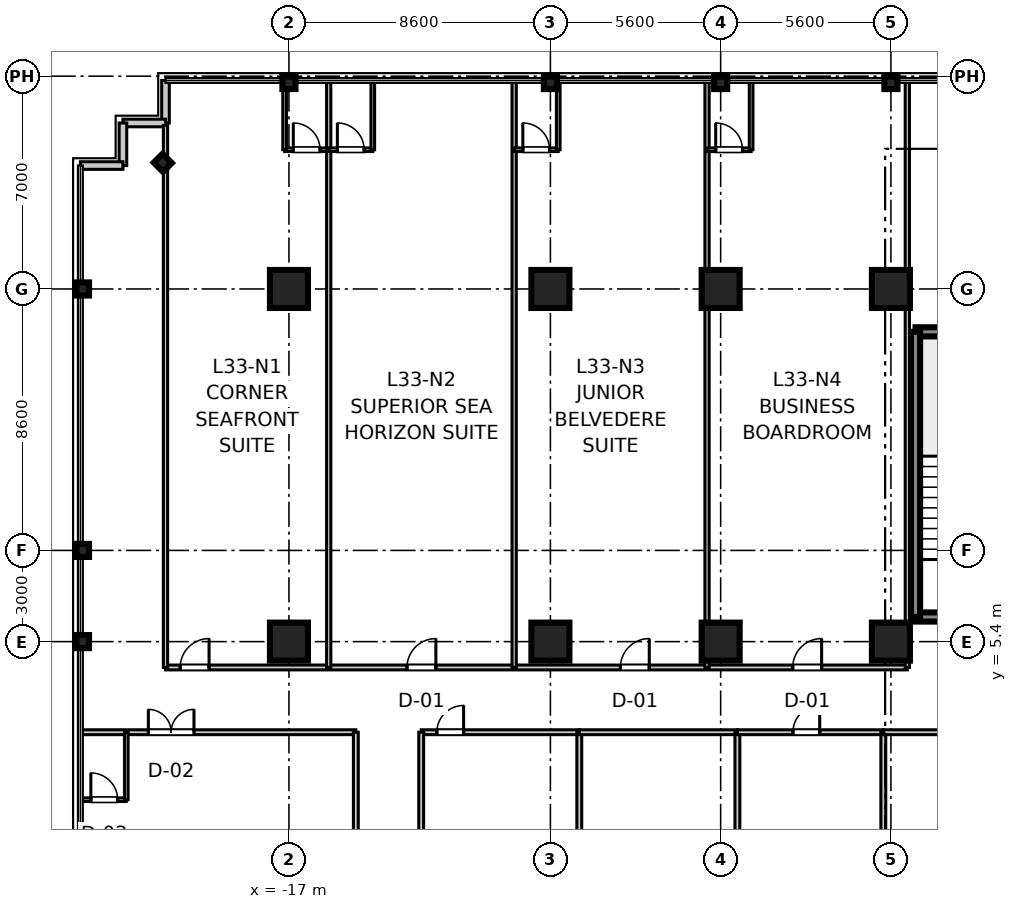
"""IFC4 building model, lengths in metres.
Left out: names, types, materials, properties, quantities, classifications, styles, units other than length and angle.
Written with IfcOpenShell. Run it as: python <this file> out.ifc"""

import sys

from ifc_helpers import new_model, si_unit, direction, frame, frame_2d, origin, origin_2d, place, context, subcontext, project, spatial, rectangle, i_section, extrude, source, transform, mapped, element, fill, save


model = new_model("IFC4")
c1 = context("Model", 3, precision=1e-05, world=origin(), true_north=direction((0.0, 1.0)))
c2 = subcontext(c1, "Body", "Model", "MODEL_VIEW")
j1 = project(units=[si_unit("LENGTHUNIT", "METRE"), si_unit("PLANEANGLEUNIT", "RADIAN")], contexts=[c1])
p1 = place(None, origin())
s1 = spatial("IfcSite", under=j1, at=p1, CompositionType="ELEMENT")
p2 = place(p1, origin())
s2 = spatial("IfcBuilding", under=s1, at=p2, CompositionType="ELEMENT")
p3 = place(p2, frame((0.0, 0.0, 132.1)))
s3 = spatial("IfcBuildingStorey", under=s2, at=p3, CompositionType="ELEMENT", Elevation=132.1)
m1 = source(origin(), c2, "Body", "SweptSolid", [
    extrude(rectangle(XDim=1.25, YDim=1.25, at=origin_2d()), origin(), (0.0, 0.0, 1.0), 3.605),
])
for number, where, z_axis, x_axis in (
    (1, (-17.0, 5.4, 0.0), (0.0, 0.0, 1.0), (1.0, 0.0, 0.0)),
    (2, (-17.0, 17.0, 0.0), (0.0, 0.0, 1.0), (1.0, 0.0, 0.0)),
    (3, (-8.4, 5.4, 0.0), (0.0, 0.0, 1.0), (1.0, 0.0, 0.0)),
    (4, (-8.4, 17.0, 0.0), (0.0, 0.0, 1.0), (1.0, 0.0, 0.0)),
    (5, (-2.8, 5.4, 0.0), (0.0, 0.0, 1.0), (1.0, 0.0, 0.0)),
    (6, (-2.8, 17.0, 0.0), (0.0, 0.0, 1.0), (1.0, 0.0, 0.0)),
    (7, (2.8, 5.4, 0.0), (0.0, 0.0, 1.0), (1.0, 0.0, 0.0)),
    (8, (2.8, 17.0, 0.0), (0.0, 0.0, 1.0), (1.0, 0.0, 0.0)),
):
    element("IfcColumn", number, at=place(p3, frame(where, z_axis=z_axis, x_axis=x_axis)), inside=s3, PredefinedType="COLUMN", context=c2, shape_type="MappedRepresentation", body=[
        mapped(m1, transform((0.0, 0.0, 0.0), scale=1.0)),
    ])
m2 = source(origin(), c2, "Body", "SweptSolid", [
    extrude(i_section(OverallWidth=0.409, OverallDepth=0.43, WebThickness=0.021, FlangeThickness=0.034, at=origin_2d()), origin(), (0.0, 0.0, 1.0), 3.605),
])
for number, where, z_axis, x_axis in (
    (9, (-23.78, 5.4, 0.0), (0.0, 0.0, 1.0), (1.0, 0.0, 0.0)),
    (10, (-23.78, 8.4, 0.0), (0.0, 0.0, 1.0), (1.0, 0.0, 0.0)),
    (11, (-23.78, 17.0, 0.0), (0.0, 0.0, 1.0), (1.0, 0.0, 0.0)),
    (12, (-17.0, 23.78, 0.0), (0.0, 0.0, 1.0), (0.0, 1.0, 0.0)),
    (13, (-8.4, 23.78, 0.0), (0.0, 0.0, 1.0), (0.0, 1.0, 0.0)),
    (14, (-2.8, 23.78, 0.0), (0.0, 0.0, 1.0), (0.0, 1.0, 0.0)),
    (15, (2.8, 23.78, 0.0), (0.0, 0.0, 1.0), (0.0, 1.0, 0.0)),
    (16, (-21.15, 21.15, 0.0), (0.0, 0.0, 1.0), (0.707, 0.707, 0.0)),
):
    element("IfcColumn", number, at=place(p3, frame(where, z_axis=z_axis, x_axis=x_axis)), inside=s3, PredefinedType="COLUMN", context=c2, shape_type="MappedRepresentation", body=[
        mapped(m2, transform((0.0, 0.0, 0.0), scale=1.0)),
    ])
m3 = source(origin(), c2, "Body", "SweptSolid", [
    extrude(rectangle(XDim=3.98, YDim=0.3, at=frame_2d((1.99, 0.0))), origin(), (0.0, 0.0, 1.0), 3.38),
])
for number, where, z_axis, x_axis in (
    (17, (3.61, 6.21, 0.0), (0.0, 0.0, 1.0), (1.0, 0.0, 0.0)),
    (18, (3.61, 15.59, 0.0), (0.0, 0.0, 1.0), (1.0, 0.0, 0.0)),
):
    element("IfcWall", number, at=place(p3, frame(where, z_axis=z_axis, x_axis=x_axis)), inside=s3, PredefinedType="SHEAR", context=c2, shape_type="MappedRepresentation", body=[
        mapped(m3, transform((0.0, 0.0, 0.0), scale=1.0)),
    ])
m4 = source(origin(), c2, "Body", "SweptSolid", [
    extrude(rectangle(XDim=9.38, YDim=0.3, at=frame_2d((4.69, 0.0))), origin(), (0.0, 0.0, 1.0), 3.38),
])
p4 = place(p3, frame((3.61, 6.21, 0.0), z_axis=(0.0, 0.0, 1.0), x_axis=(0.0, 1.0, 0.0)))
e19 = element("IfcWall", 19, at=p4, inside=s3, PredefinedType="SHEAR", context=c2, shape_type="MappedRepresentation", body=[
    mapped(m4, transform((0.0, 0.0, 0.0), scale=1.0)),
])
m5 = source(origin(), c2, "Body", "SweptSolid", [
    extrude(rectangle(XDim=1.4, YDim=0.25, at=frame_2d((0.7, 0.0))), origin(), (0.0, 0.0, 1.0), 3.38),
])
p5 = place(p3, frame((-21.06, 22.46, 0.0), z_axis=(0.0, 0.0, 1.0), x_axis=(0.0, 1.0, 0.0)))
e20 = element("IfcWall", 20, at=p5, inside=s3, PredefinedType="STANDARD", context=c2, shape_type="MappedRepresentation", body=[
    mapped(m5, transform((0.0, 0.0, 0.0), scale=1.0)),
])
m6 = source(origin(), c2, "Body", "SweptSolid", [
    extrude(rectangle(XDim=1.4, YDim=0.25, at=frame_2d((0.7, 0.0))), origin(), (0.0, 0.0, 1.0), 3.38),
])
for number, where, z_axis, x_axis in (
    (21, (-22.46, 22.46, 0.0), (0.0, 0.0, 1.0), (1.0, 0.0, 0.0)),
    (22, (-22.46, 21.06, 0.0), (0.0, 0.0, 1.0), (0.0, 1.0, 0.0)),
):
    element("IfcWall", number, at=place(p3, frame(where, z_axis=z_axis, x_axis=x_axis)), inside=s3, PredefinedType="STANDARD", context=c2, shape_type="MappedRepresentation", body=[
        mapped(m6, transform((0.0, 0.0, 0.0), scale=1.0)),
    ])
p6 = place(p3, frame((-23.86, 21.06, 0.0), z_axis=(0.0, 0.0, 1.0), x_axis=(1.0, 0.0, 0.0)))
e23 = element("IfcWall", 23, at=p6, inside=s3, PredefinedType="STANDARD", context=c2, shape_type="MappedRepresentation", body=[
    mapped(m5, transform((0.0, 0.0, 0.0), scale=1.0)),
])
m7 = source(origin(), c2, "Body", "SweptSolid", [
    extrude(rectangle(XDim=24.4, YDim=0.16, at=frame_2d((12.2, 0.0))), origin(), (0.0, 0.0, 1.0), 2.72),
])
p7 = place(p3, frame((-21.06, 4.55, 0.0), z_axis=(0.0, 0.0, 1.0), x_axis=(1.0, 0.0, 0.0)))
e24 = element("IfcWall", 24, at=p7, inside=s3, PredefinedType="PARTITIONING", context=c2, shape_type="MappedRepresentation", body=[
    mapped(m7, transform((0.0, 0.0, 0.0), scale=1.0)),
])
p8 = place(p7, frame((0.483, 0.0, 0.0)))
e25 = element("IfcOpeningElement", 25, at=p8, cuts=e24, PredefinedType="OPENING", context=c2, shape_type="SweptSolid", body=[
    extrude(rectangle(XDim=0.95, YDim=2.1, at=frame_2d((0.475, 1.05))), frame((0.0, 0.09, 0.0), z_axis=(0.0, -1.0, 0.0), x_axis=(1.0, 0.0, 0.0)), (0.0, 0.0, 1.0), 0.18),
])
p9 = place(p7, frame((7.943, 0.0, 0.0)))
e26 = element("IfcOpeningElement", 26, at=p9, cuts=e24, PredefinedType="OPENING", context=c2, shape_type="SweptSolid", body=[
    extrude(rectangle(XDim=0.95, YDim=2.1, at=frame_2d((0.475, 1.05))), frame((0.0, 0.09, 0.0), z_axis=(0.0, -1.0, 0.0), x_axis=(1.0, 0.0, 0.0)), (0.0, 0.0, 1.0), 0.18),
])
p10 = place(p7, frame((14.962, 0.0, 0.0)))
e27 = element("IfcOpeningElement", 27, at=p10, cuts=e24, PredefinedType="OPENING", context=c2, shape_type="SweptSolid", body=[
    extrude(rectangle(XDim=0.95, YDim=2.1, at=frame_2d((0.475, 1.05))), frame((0.0, 0.09, 0.0), z_axis=(0.0, -1.0, 0.0), x_axis=(1.0, 0.0, 0.0)), (0.0, 0.0, 1.0), 0.18),
])
p11 = place(p7, frame((20.631, 0.0, 0.0)))
e28 = element("IfcOpeningElement", 28, at=p11, cuts=e24, PredefinedType="OPENING", context=c2, shape_type="SweptSolid", body=[
    extrude(rectangle(XDim=0.95, YDim=2.1, at=frame_2d((0.475, 1.05))), frame((0.0, 0.09, 0.0), z_axis=(0.0, -1.0, 0.0), x_axis=(1.0, 0.0, 0.0)), (0.0, 0.0, 1.0), 0.18),
])
m8 = source(origin(), c2, "Body", "SweptSolid", [
    extrude(rectangle(XDim=17.83, YDim=0.14, at=frame_2d((8.915, 0.0))), origin(), (0.0, 0.0, 1.0), 2.72),
])
p12 = place(p3, frame((-21.06, 4.55, 0.0), z_axis=(0.0, 0.0, 1.0), x_axis=(0.0, 1.0, 0.0)))
e29 = element("IfcWall", 29, at=p12, inside=s3, PredefinedType="PARTITIONING", context=c2, shape_type="MappedRepresentation", body=[
    mapped(m8, transform((0.0, 0.0, 0.0), scale=1.0)),
])
m9 = source(origin(), c2, "Body", "SweptSolid", [
    extrude(rectangle(XDim=19.25, YDim=0.14, at=frame_2d((9.625, 0.0))), origin(), (0.0, 0.0, 1.0), 2.72),
])
p13 = place(p3, frame((3.34, 4.55, 0.0), z_axis=(0.0, 0.0, 1.0), x_axis=(0.0, 1.0, 0.0)))
e30 = element("IfcWall", 30, at=p13, inside=s3, PredefinedType="PARTITIONING", context=c2, shape_type="MappedRepresentation", body=[
    mapped(m9, transform((0.0, 0.0, 0.0), scale=1.0)),
])
m10 = source(origin(), c2, "Body", "SweptSolid", [
    extrude(rectangle(XDim=1.45, YDim=0.12, at=frame_2d((0.725, 0.0))), origin(), (0.0, 0.0, 1.0), 2.72),
])
p14 = place(p3, frame((-17.142, 21.58, 0.0), z_axis=(0.0, 0.0, 1.0), x_axis=(1.0, 0.0, 0.0)))
e31 = element("IfcWall", 31, at=p14, inside=s3, PredefinedType="PARTITIONING", context=c2, shape_type="MappedRepresentation", body=[
    mapped(m10, transform((0.0, 0.0, 0.0), scale=1.0)),
])
p15 = place(p14, frame((0.285, 0.0, 0.0)))
e32 = element("IfcOpeningElement", 32, at=p15, cuts=e31, PredefinedType="OPENING", context=c2, shape_type="SweptSolid", body=[
    extrude(rectangle(XDim=0.88, YDim=2.1, at=frame_2d((0.44, 1.05))), frame((0.0, 0.07, 0.0), z_axis=(0.0, -1.0, 0.0), x_axis=(1.0, 0.0, 0.0)), (0.0, 0.0, 1.0), 0.14),
])
m11 = source(origin(), c2, "Body", "SweptSolid", [
    extrude(rectangle(XDim=2.22, YDim=0.12, at=frame_2d((1.11, 0.0))), origin(), (0.0, 0.0, 1.0), 2.72),
])
p16 = place(p3, frame((-17.142, 21.58, 0.0), z_axis=(0.0, 0.0, 1.0), x_axis=(0.0, 1.0, 0.0)))
e33 = element("IfcWall", 33, at=p16, inside=s3, PredefinedType="PARTITIONING", context=c2, shape_type="MappedRepresentation", body=[
    mapped(m11, transform((0.0, 0.0, 0.0), scale=1.0)),
])
p17 = place(p3, frame((-15.692, 4.55, 0.0), z_axis=(0.0, 0.0, 1.0), x_axis=(0.0, 1.0, 0.0)))
e34 = element("IfcWall", 34, at=p17, inside=s3, PredefinedType="PARTITIONING", context=c2, shape_type="MappedRepresentation", body=[
    mapped(m9, transform((0.0, 0.0, 0.0), scale=1.0)),
])
m12 = source(origin(), c2, "Body", "SweptSolid", [
    extrude(rectangle(XDim=1.45, YDim=0.12, at=frame_2d((0.725, 0.0))), origin(), (0.0, 0.0, 1.0), 2.72),
])
p18 = place(p3, frame((-15.692, 21.58, 0.0), z_axis=(0.0, 0.0, 1.0), x_axis=(1.0, 0.0, 0.0)))
e35 = element("IfcWall", 35, at=p18, inside=s3, PredefinedType="PARTITIONING", context=c2, shape_type="MappedRepresentation", body=[
    mapped(m12, transform((0.0, 0.0, 0.0), scale=1.0)),
])
p19 = place(p18, frame((0.285, 0.0, 0.0)))
e36 = element("IfcOpeningElement", 36, at=p19, cuts=e35, PredefinedType="OPENING", context=c2, shape_type="SweptSolid", body=[
    extrude(rectangle(XDim=0.88, YDim=2.1, at=frame_2d((0.44, 1.05))), frame((0.0, 0.07, 0.0), z_axis=(0.0, -1.0, 0.0), x_axis=(1.0, 0.0, 0.0)), (0.0, 0.0, 1.0), 0.14),
])
p20 = place(p3, frame((-14.242, 21.58, 0.0), z_axis=(0.0, 0.0, 1.0), x_axis=(0.0, 1.0, 0.0)))
e37 = element("IfcWall", 37, at=p20, inside=s3, PredefinedType="PARTITIONING", context=c2, shape_type="MappedRepresentation", body=[
    mapped(m11, transform((0.0, 0.0, 0.0), scale=1.0)),
])
p21 = place(p3, frame((-9.592, 4.55, 0.0), z_axis=(0.0, 0.0, 1.0), x_axis=(0.0, 1.0, 0.0)))
e38 = element("IfcWall", 38, at=p21, inside=s3, PredefinedType="PARTITIONING", context=c2, shape_type="MappedRepresentation", body=[
    mapped(m9, transform((0.0, 0.0, 0.0), scale=1.0)),
])
p22 = place(p3, frame((-9.592, 21.58, 0.0), z_axis=(0.0, 0.0, 1.0), x_axis=(1.0, 0.0, 0.0)))
e39 = element("IfcWall", 39, at=p22, inside=s3, PredefinedType="PARTITIONING", context=c2, shape_type="MappedRepresentation", body=[
    mapped(m12, transform((0.0, 0.0, 0.0), scale=1.0)),
])
p23 = place(p22, frame((0.285, 0.0, 0.0)))
e40 = element("IfcOpeningElement", 40, at=p23, cuts=e39, PredefinedType="OPENING", context=c2, shape_type="SweptSolid", body=[
    extrude(rectangle(XDim=0.88, YDim=2.1, at=frame_2d((0.44, 1.05))), frame((0.0, 0.07, 0.0), z_axis=(0.0, -1.0, 0.0), x_axis=(1.0, 0.0, 0.0)), (0.0, 0.0, 1.0), 0.14),
])
p24 = place(p3, frame((-8.142, 21.58, 0.0), z_axis=(0.0, 0.0, 1.0), x_axis=(0.0, 1.0, 0.0)))
e41 = element("IfcWall", 41, at=p24, inside=s3, PredefinedType="PARTITIONING", context=c2, shape_type="MappedRepresentation", body=[
    mapped(m11, transform((0.0, 0.0, 0.0), scale=1.0)),
])
p25 = place(p3, frame((-3.248, 4.55, 0.0), z_axis=(0.0, 0.0, 1.0), x_axis=(0.0, 1.0, 0.0)))
e42 = element("IfcWall", 42, at=p25, inside=s3, PredefinedType="PARTITIONING", context=c2, shape_type="MappedRepresentation", body=[
    mapped(m9, transform((0.0, 0.0, 0.0), scale=1.0)),
])
p26 = place(p3, frame((-3.248, 21.58, 0.0), z_axis=(0.0, 0.0, 1.0), x_axis=(1.0, 0.0, 0.0)))
e43 = element("IfcWall", 43, at=p26, inside=s3, PredefinedType="PARTITIONING", context=c2, shape_type="MappedRepresentation", body=[
    mapped(m12, transform((0.0, 0.0, 0.0), scale=1.0)),
])
p27 = place(p26, frame((0.285, 0.0, 0.0)))
e44 = element("IfcOpeningElement", 44, at=p27, cuts=e43, PredefinedType="OPENING", context=c2, shape_type="SweptSolid", body=[
    extrude(rectangle(XDim=0.88, YDim=2.1, at=frame_2d((0.44, 1.05))), frame((0.0, 0.07, 0.0), z_axis=(0.0, -1.0, 0.0), x_axis=(1.0, 0.0, 0.0)), (0.0, 0.0, 1.0), 0.14),
])
p28 = place(p3, frame((-1.798, 21.58, 0.0), z_axis=(0.0, 0.0, 1.0), x_axis=(0.0, 1.0, 0.0)))
e45 = element("IfcWall", 45, at=p28, inside=s3, PredefinedType="PARTITIONING", context=c2, shape_type="MappedRepresentation", body=[
    mapped(m11, transform((0.0, 0.0, 0.0), scale=1.0)),
])
m13 = source(origin(), c2, "Body", "SweptSolid", [
    extrude(rectangle(XDim=9.0, YDim=0.16, at=frame_2d((4.5, 0.0))), origin(), (0.0, 0.0, 1.0), 2.72),
])
p29 = place(p3, frame((-23.8, 2.42, 0.0), z_axis=(0.0, 0.0, 1.0), x_axis=(1.0, 0.0, 0.0)))
e46 = element("IfcWall", 46, at=p29, inside=s3, PredefinedType="PARTITIONING", context=c2, shape_type="MappedRepresentation", body=[
    mapped(m13, transform((0.0, 0.0, 0.0), scale=1.0)),
])
p30 = place(p29, frame((2.176, 0.0, 0.0)))
e47 = element("IfcOpeningElement", 47, at=p30, cuts=e46, PredefinedType="OPENING", context=c2, shape_type="SweptSolid", body=[
    extrude(rectangle(XDim=1.5, YDim=2.15, at=frame_2d((0.75, 1.075))), frame((0.0, 0.09, 0.0), z_axis=(0.0, -1.0, 0.0), x_axis=(1.0, 0.0, 0.0)), (0.0, 0.0, 1.0), 0.18),
])
m14 = source(origin(), c2, "Body", "SweptSolid", [
    extrude(rectangle(XDim=4.84, YDim=0.16, at=frame_2d((2.42, 0.0))), origin(), (0.0, 0.0, 1.0), 2.72),
])
p31 = place(p3, frame((-14.8, -2.42, 0.0), z_axis=(0.0, 0.0, 1.0), x_axis=(0.0, 1.0, 0.0)))
e48 = element("IfcWall", 48, at=p31, inside=s3, PredefinedType="PARTITIONING", context=c2, shape_type="MappedRepresentation", body=[
    mapped(m14, transform((0.0, 0.0, 0.0), scale=1.0)),
])
p32 = place(p3, frame((-23.8, 0.2, 0.0), z_axis=(0.0, 0.0, 1.0), x_axis=(1.0, 0.0, 0.0)))
e49 = element("IfcWall", 49, at=p32, inside=s3, PredefinedType="PARTITIONING", context=c2, shape_type="MappedRepresentation", body=[
    mapped(m12, transform((0.0, 0.0, 0.0), scale=1.0)),
])
p33 = place(p32, frame((0.285, 0.0, 0.0)))
e50 = element("IfcOpeningElement", 50, at=p33, cuts=e49, PredefinedType="OPENING", context=c2, shape_type="SweptSolid", body=[
    extrude(rectangle(XDim=0.88, YDim=2.1, at=frame_2d((0.44, 1.05))), frame((0.0, 0.07, 0.0), z_axis=(0.0, -1.0, 0.0), x_axis=(1.0, 0.0, 0.0)), (0.0, 0.0, 1.0), 0.14),
])
p34 = place(p3, frame((-22.35, 0.2, 0.0), z_axis=(0.0, 0.0, 1.0), x_axis=(0.0, 1.0, 0.0)))
e51 = element("IfcWall", 51, at=p34, inside=s3, PredefinedType="PARTITIONING", context=c2, shape_type="MappedRepresentation", body=[
    mapped(m11, transform((0.0, 0.0, 0.0), scale=1.0)),
])
m15 = source(origin(), c2, "Body", "SweptSolid", [
    extrude(rectangle(XDim=5.2, YDim=0.16, at=frame_2d((2.6, 0.0))), origin(), (0.0, 0.0, 1.0), 2.72),
])
p35 = place(p3, frame((-12.65, 2.42, 0.0), z_axis=(0.0, 0.0, 1.0), x_axis=(1.0, 0.0, 0.0)))
e52 = element("IfcWall", 52, at=p35, inside=s3, PredefinedType="PARTITIONING", context=c2, shape_type="MappedRepresentation", body=[
    mapped(m15, transform((0.0, 0.0, 0.0), scale=1.0)),
])
p36 = place(p35, frame((0.515, 0.0, 0.0)))
e53 = element("IfcOpeningElement", 53, at=p36, cuts=e52, PredefinedType="OPENING", context=c2, shape_type="SweptSolid", body=[
    extrude(rectangle(XDim=0.88, YDim=2.1, at=frame_2d((0.44, 1.05))), frame((0.0, 0.09, 0.0), z_axis=(0.0, -1.0, 0.0), x_axis=(1.0, 0.0, 0.0)), (0.0, 0.0, 1.0), 0.18),
])
for number, where, z_axis, x_axis in (
    (54, (-12.65, -2.42, 0.0), (0.0, 0.0, 1.0), (0.0, 1.0, 0.0)),
    (55, (-7.45, -2.42, 0.0), (0.0, 0.0, 1.0), (0.0, 1.0, 0.0)),
):
    element("IfcWall", number, at=place(p3, frame(where, z_axis=z_axis, x_axis=x_axis)), inside=s3, PredefinedType="PARTITIONING", context=c2, shape_type="MappedRepresentation", body=[
        mapped(m14, transform((0.0, 0.0, 0.0), scale=1.0)),
    ])
p37 = place(p3, frame((-7.45, 2.42, 0.0), z_axis=(0.0, 0.0, 1.0), x_axis=(1.0, 0.0, 0.0)))
e56 = element("IfcWall", 56, at=p37, inside=s3, PredefinedType="PARTITIONING", context=c2, shape_type="MappedRepresentation", body=[
    mapped(m15, transform((0.0, 0.0, 0.0), scale=1.0)),
])
p38 = place(p3, frame((-2.25, -2.42, 0.0), z_axis=(0.0, 0.0, 1.0), x_axis=(0.0, 1.0, 0.0)))
e57 = element("IfcWall", 57, at=p38, inside=s3, PredefinedType="PARTITIONING", context=c2, shape_type="MappedRepresentation", body=[
    mapped(m14, transform((0.0, 0.0, 0.0), scale=1.0)),
])
m16 = source(origin(), c2, "Body", "SweptSolid", [
    extrude(rectangle(XDim=4.8, YDim=0.16, at=frame_2d((2.4, 0.0))), origin(), (0.0, 0.0, 1.0), 2.72),
])
p39 = place(p3, frame((-2.25, 2.42, 0.0), z_axis=(0.0, 0.0, 1.0), x_axis=(1.0, 0.0, 0.0)))
e58 = element("IfcWall", 58, at=p39, inside=s3, PredefinedType="PARTITIONING", context=c2, shape_type="MappedRepresentation", body=[
    mapped(m16, transform((0.0, 0.0, 0.0), scale=1.0)),
])
p40 = place(p39, frame((1.828, 0.0, 0.0)))
e59 = element("IfcOpeningElement", 59, at=p40, cuts=e58, PredefinedType="OPENING", context=c2, shape_type="SweptSolid", body=[
    extrude(rectangle(XDim=0.88, YDim=2.1, at=frame_2d((0.44, 1.05))), frame((0.0, 0.09, 0.0), z_axis=(0.0, -1.0, 0.0), x_axis=(1.0, 0.0, 0.0)), (0.0, 0.0, 1.0), 0.18),
])
p41 = place(p3, frame((2.55, -2.42, 0.0), z_axis=(0.0, 0.0, 1.0), x_axis=(0.0, 1.0, 0.0)))
e60 = element("IfcWall", 60, at=p41, inside=s3, PredefinedType="PARTITIONING", context=c2, shape_type="MappedRepresentation", body=[
    mapped(m14, transform((0.0, 0.0, 0.0), scale=1.0)),
])
p42 = place(p3, frame((2.55, 2.42, 0.0), z_axis=(0.0, 0.0, 1.0), x_axis=(1.0, 0.0, 0.0)))
e61 = element("IfcWall", 61, at=p42, inside=s3, PredefinedType="PARTITIONING", context=c2, shape_type="MappedRepresentation", body=[
    mapped(m16, transform((0.0, 0.0, 0.0), scale=1.0)),
])
m17 = source(origin(), c2, "Body", "SweptSolid", [
    extrude(rectangle(XDim=0.88, YDim=2.1, at=frame_2d((0.44, 1.05))), frame((0.0, 0.025, 0.0), z_axis=(0.0, -1.0, 0.0), x_axis=(1.0, 0.0, 0.0)), (0.0, 0.0, 1.0), 0.05),
])
p43 = place(p15, origin())
e62 = element("IfcDoor", 62, at=p43, inside=s3, OperationType="SINGLE_SWING_LEFT", PredefinedType="DOOR", context=c2, shape_type="MappedRepresentation", body=[
    mapped(m17, transform((0.0, 0.0, 0.0), scale=1.0)),
])
fill(e32, e62)
m18 = source(origin(), c2, "Body", "SweptSolid", [
    extrude(rectangle(XDim=0.95, YDim=2.1, at=frame_2d((0.475, 1.05))), frame((0.0, 0.025, 0.0), z_axis=(0.0, -1.0, 0.0), x_axis=(1.0, 0.0, 0.0)), (0.0, 0.0, 1.0), 0.05),
])
p44 = place(p8, origin())
e63 = element("IfcDoor", 63, at=p44, inside=s3, OperationType="SINGLE_SWING_RIGHT", PredefinedType="DOOR", context=c2, shape_type="MappedRepresentation", body=[
    mapped(m18, transform((0.0, 0.0, 0.0), scale=1.0)),
])
fill(e25, e63)
p45 = place(p19, origin())
e64 = element("IfcDoor", 64, at=p45, inside=s3, OperationType="SINGLE_SWING_LEFT", PredefinedType="DOOR", context=c2, shape_type="MappedRepresentation", body=[
    mapped(m17, transform((0.0, 0.0, 0.0), scale=1.0)),
])
fill(e36, e64)
p46 = place(p9, origin())
e65 = element("IfcDoor", 65, at=p46, inside=s3, OperationType="SINGLE_SWING_RIGHT", PredefinedType="DOOR", context=c2, shape_type="MappedRepresentation", body=[
    mapped(m18, transform((0.0, 0.0, 0.0), scale=1.0)),
])
fill(e26, e65)
p47 = place(p23, origin())
e66 = element("IfcDoor", 66, at=p47, inside=s3, OperationType="SINGLE_SWING_LEFT", PredefinedType="DOOR", context=c2, shape_type="MappedRepresentation", body=[
    mapped(m17, transform((0.0, 0.0, 0.0), scale=1.0)),
])
fill(e40, e66)
p48 = place(p10, origin())
e67 = element("IfcDoor", 67, at=p48, inside=s3, OperationType="SINGLE_SWING_RIGHT", PredefinedType="DOOR", context=c2, shape_type="MappedRepresentation", body=[
    mapped(m18, transform((0.0, 0.0, 0.0), scale=1.0)),
])
fill(e27, e67)
p49 = place(p27, origin())
e68 = element("IfcDoor", 68, at=p49, inside=s3, OperationType="SINGLE_SWING_LEFT", PredefinedType="DOOR", context=c2, shape_type="MappedRepresentation", body=[
    mapped(m17, transform((0.0, 0.0, 0.0), scale=1.0)),
])
fill(e44, e68)
p50 = place(p11, origin())
e69 = element("IfcDoor", 69, at=p50, inside=s3, OperationType="SINGLE_SWING_RIGHT", PredefinedType="DOOR", context=c2, shape_type="MappedRepresentation", body=[
    mapped(m18, transform((0.0, 0.0, 0.0), scale=1.0)),
])
fill(e28, e69)
p51 = place(p33, origin())
e70 = element("IfcDoor", 70, at=p51, inside=s3, OperationType="SINGLE_SWING_LEFT", PredefinedType="DOOR", context=c2, shape_type="MappedRepresentation", body=[
    mapped(m17, transform((0.0, 0.0, 0.0), scale=1.0)),
])
fill(e50, e70)
m19 = source(origin(), c2, "Body", "SweptSolid", [
    extrude(rectangle(XDim=1.5, YDim=2.15, at=frame_2d((0.75, 1.075))), frame((0.0, 0.025, 0.0), z_axis=(0.0, -1.0, 0.0), x_axis=(1.0, 0.0, 0.0)), (0.0, 0.0, 1.0), 0.05),
])
p52 = place(p30, origin())
e71 = element("IfcDoor", 71, at=p52, inside=s3, OperationType="DOUBLE_DOOR_SINGLE_SWING", PredefinedType="DOOR", context=c2, shape_type="MappedRepresentation", body=[
    mapped(m19, transform((0.0, 0.0, 0.0), scale=1.0)),
])
fill(e47, e71)
p53 = place(p36, frame((0.88, 0.0, 0.0), z_axis=(0.0, 0.0, 1.0), x_axis=(-1.0, 0.0, 0.0)))
e72 = element("IfcDoor", 72, at=p53, inside=s3, OperationType="SINGLE_SWING_RIGHT", PredefinedType="DOOR", context=c2, shape_type="MappedRepresentation", body=[
    mapped(m17, transform((0.0, 0.0, 0.0), scale=1.0)),
])
fill(e53, e72)
p54 = place(p40, frame((0.88, 0.0, 0.0), z_axis=(0.0, 0.0, 1.0), x_axis=(-1.0, 0.0, 0.0)))
e73 = element("IfcDoor", 73, at=p54, inside=s3, OperationType="SINGLE_SWING_RIGHT", PredefinedType="DOOR", context=c2, shape_type="MappedRepresentation", body=[
    mapped(m17, transform((0.0, 0.0, 0.0), scale=1.0)),
])
fill(e59, e73)
save(model, sys.argv[1])
